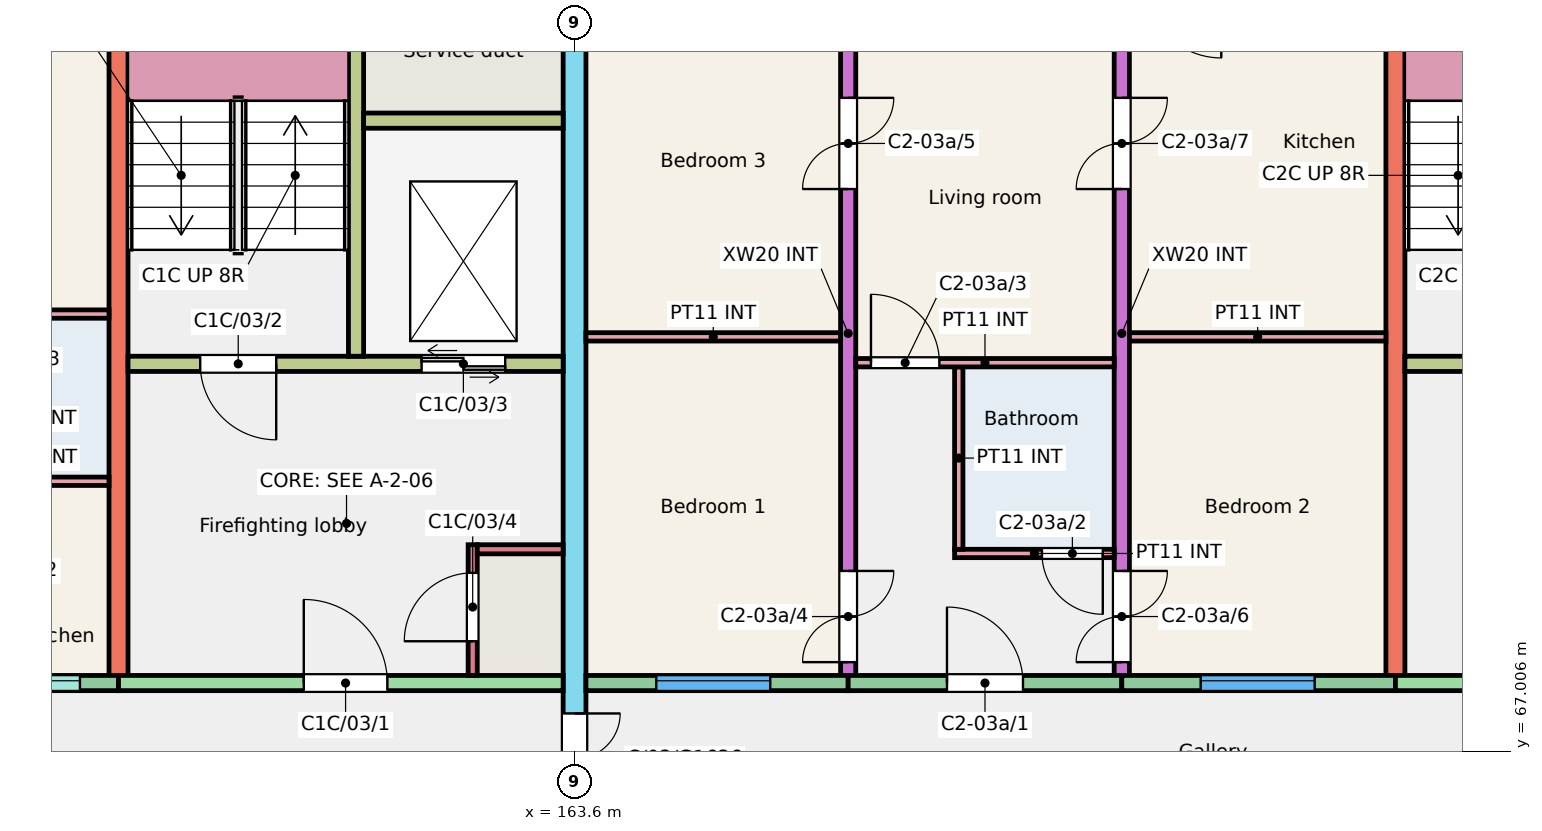
"""IFC4 building model, lengths in metres.
Left out: names, types, materials, properties, quantities, classifications, styles, units other than length and angle.
Written with IfcOpenShell. Run it as: python <this file> out.ifc"""

import sys

from ifc_helpers import new_model, si_unit, direction, frame, frame_2d, origin, place, context, subcontext, project, spatial, rectangle, extrude, element, fill, save


model = new_model("IFC4")
c1 = context("Model", 3, precision=1e-05, world=origin(), true_north=direction((0.0, 1.0)))
c2 = subcontext(c1, "Body", "Model", "MODEL_VIEW")
j1 = project(units=[si_unit("LENGTHUNIT", "METRE"), si_unit("PLANEANGLEUNIT", "RADIAN")], contexts=[c1])
p1 = place(None, origin())
s1 = spatial("IfcSite", under=j1, at=p1, CompositionType="ELEMENT")
p2 = place(p1, origin())
s2 = spatial("IfcBuilding", under=s1, at=p2, CompositionType="ELEMENT")
p3 = place(p2, frame((0.0, 0.0, 9.0)))
s3 = spatial("IfcBuildingStorey", under=s2, at=p3, CompositionType="ELEMENT", Elevation=9.0)
p4 = place(p3, frame((157.6, 68.0, 0.0), z_axis=(0.0, 0.0, 1.0), x_axis=(0.0, 1.0, 0.0)))
e1 = element("IfcWall", 1, at=p4, inside=s3, PredefinedType="SHEAR", context=c2, shape_type="SweptSolid", body=[
    extrude(rectangle(XDim=9.0, YDim=0.25, at=frame_2d((4.5, 0.0))), origin(), (0.0, 0.0, 1.0), 3.0),
])
p5 = place(p3, frame((163.6, 66.0, 0.0), z_axis=(0.0, 0.0, 1.0), x_axis=(0.0, 1.0, 0.0)))
e2 = element("IfcWall", 2, at=p5, inside=s3, PredefinedType="SHEAR", context=c2, shape_type="SweptSolid", body=[
    extrude(rectangle(XDim=11.0, YDim=0.3, at=frame_2d((5.5, 0.0))), origin(), (0.0, 0.0, 1.0), 3.0),
])
p6 = place(p5, frame((0.3, 0.0, 0.0)))
e3 = element("IfcOpeningElement", 3, at=p6, cuts=e2, PredefinedType="OPENING", context=c2, shape_type="SweptSolid", body=[
    extrude(rectangle(XDim=1.2, YDim=2.1, at=frame_2d((0.6, 1.05))), frame((0.0, 0.16, 0.0), z_axis=(0.0, -1.0, 0.0), x_axis=(1.0, 0.0, 0.0)), (0.0, 0.0, 1.0), 0.32),
])
p7 = place(p3, frame((167.2, 68.0, 0.0), z_axis=(0.0, 0.0, 1.0), x_axis=(0.0, 1.0, 0.0)))
e4 = element("IfcWall", 4, at=p7, inside=s3, PredefinedType="SHEAR", context=c2, shape_type="SweptSolid", body=[
    extrude(rectangle(XDim=9.0, YDim=0.2, at=frame_2d((4.5, 0.0))), origin(), (0.0, 0.0, 1.0), 3.0),
])
p8 = place(p7, frame((0.175, 0.0, 0.0)))
e5 = element("IfcOpeningElement", 5, at=p8, cuts=e4, PredefinedType="OPENING", context=c2, shape_type="SweptSolid", body=[
    extrude(rectangle(XDim=1.2, YDim=2.1, at=frame_2d((0.6, 1.05))), frame((0.0, 0.11, 0.0), z_axis=(0.0, -1.0, 0.0), x_axis=(1.0, 0.0, 0.0)), (0.0, 0.0, 1.0), 0.22),
])
p9 = place(p7, frame((6.4, 0.0, 0.0)))
e6 = element("IfcOpeningElement", 6, at=p9, cuts=e4, PredefinedType="OPENING", context=c2, shape_type="SweptSolid", body=[
    extrude(rectangle(XDim=1.2, YDim=2.1, at=frame_2d((0.6, 1.05))), frame((0.0, 0.11, 0.0), z_axis=(0.0, -1.0, 0.0), x_axis=(1.0, 0.0, 0.0)), (0.0, 0.0, 1.0), 0.22),
])
p10 = place(p3, frame((170.8, 68.0, 0.0), z_axis=(0.0, 0.0, 1.0), x_axis=(0.0, 1.0, 0.0)))
e7 = element("IfcWall", 7, at=p10, inside=s3, PredefinedType="SHEAR", context=c2, shape_type="SweptSolid", body=[
    extrude(rectangle(XDim=9.0, YDim=0.2, at=frame_2d((4.5, 0.0))), origin(), (0.0, 0.0, 1.0), 3.0),
])
p11 = place(p10, frame((0.175, 0.0, 0.0)))
e8 = element("IfcOpeningElement", 8, at=p11, cuts=e7, PredefinedType="OPENING", context=c2, shape_type="SweptSolid", body=[
    extrude(rectangle(XDim=1.2, YDim=2.1, at=frame_2d((0.6, 1.05))), frame((0.0, 0.11, 0.0), z_axis=(0.0, -1.0, 0.0), x_axis=(1.0, 0.0, 0.0)), (0.0, 0.0, 1.0), 0.22),
])
p12 = place(p10, frame((6.4, 0.0, 0.0)))
e9 = element("IfcOpeningElement", 9, at=p12, cuts=e7, PredefinedType="OPENING", context=c2, shape_type="SweptSolid", body=[
    extrude(rectangle(XDim=1.2, YDim=2.1, at=frame_2d((0.6, 1.05))), frame((0.0, 0.11, 0.0), z_axis=(0.0, -1.0, 0.0), x_axis=(1.0, 0.0, 0.0)), (0.0, 0.0, 1.0), 0.22),
])
p13 = place(p3, frame((174.4, 68.0, 0.0), z_axis=(0.0, 0.0, 1.0), x_axis=(0.0, 1.0, 0.0)))
e10 = element("IfcWall", 10, at=p13, inside=s3, PredefinedType="SHEAR", context=c2, shape_type="SweptSolid", body=[
    extrude(rectangle(XDim=9.0, YDim=0.25, at=frame_2d((4.5, 0.0))), origin(), (0.0, 0.0, 1.0), 3.0),
])
p14 = place(p3, frame((154.0, 67.9, 0.0), z_axis=(0.0, 0.0, 1.0), x_axis=(1.0, 0.0, 0.0)))
e11 = element("IfcWall", 11, at=p14, inside=s3, PredefinedType="SOLIDWALL", context=c2, shape_type="SweptSolid", body=[
    extrude(rectangle(XDim=3.6, YDim=0.2, at=frame_2d((1.8, 0.0))), origin(), (0.0, 0.0, 1.0), 3.0),
])
p15 = place(p14, frame((1.893, 0.0, 1.1)))
e12 = element("IfcOpeningElement", 12, at=p15, cuts=e11, PredefinedType="OPENING", context=c2, shape_type="SweptSolid", body=[
    extrude(rectangle(XDim=1.2, YDim=1.3, at=frame_2d((0.6, 0.65))), frame((0.0, 0.11, 0.0), z_axis=(0.0, -1.0, 0.0), x_axis=(1.0, 0.0, 0.0)), (0.0, 0.0, 1.0), 0.22),
])
p16 = place(p14, frame((0.25, 0.0, 0.0)))
e13 = element("IfcOpeningElement", 13, at=p16, cuts=e11, PredefinedType="OPENING", context=c2, shape_type="SweptSolid", body=[
    extrude(rectangle(XDim=1.0, YDim=2.1, at=frame_2d((0.5, 1.05))), frame((0.0, 0.11, 0.0), z_axis=(0.0, -1.0, 0.0), x_axis=(1.0, 0.0, 0.0)), (0.0, 0.0, 1.0), 0.22),
])
p17 = place(p3, frame((157.6, 67.9, 0.0), z_axis=(0.0, 0.0, 1.0), x_axis=(1.0, 0.0, 0.0)))
e14 = element("IfcWall", 14, at=p17, inside=s3, PredefinedType="SHEAR", context=c2, shape_type="SweptSolid", body=[
    extrude(rectangle(XDim=5.85, YDim=0.2, at=frame_2d((2.925, 0.0))), origin(), (0.0, 0.0, 1.0), 3.0),
])
p18 = place(p17, frame((2.438, 0.0, 0.0)))
e15 = element("IfcOpeningElement", 15, at=p18, cuts=e14, PredefinedType="OPENING", context=c2, shape_type="SweptSolid", body=[
    extrude(rectangle(XDim=1.1, YDim=2.1, at=frame_2d((0.55, 1.05))), frame((0.0, 0.11, 0.0), z_axis=(0.0, -1.0, 0.0), x_axis=(1.0, 0.0, 0.0)), (0.0, 0.0, 1.0), 0.22),
])
p19 = place(p3, frame((157.725, 72.1, 0.0), z_axis=(0.0, 0.0, 1.0), x_axis=(1.0, 0.0, 0.0)))
e16 = element("IfcWall", 16, at=p19, inside=s3, PredefinedType="SHEAR", context=c2, shape_type="SweptSolid", body=[
    extrude(rectangle(XDim=5.725, YDim=0.2, at=frame_2d((2.862, 0.0))), origin(), (0.0, 0.0, 1.0), 3.0),
])
p20 = place(p19, frame((0.95, 0.0, 0.0)))
e17 = element("IfcOpeningElement", 17, at=p20, cuts=e16, PredefinedType="OPENING", context=c2, shape_type="SweptSolid", body=[
    extrude(rectangle(XDim=1.0, YDim=2.1, at=frame_2d((0.5, 1.05))), frame((0.0, 0.11, 0.0), z_axis=(0.0, -1.0, 0.0), x_axis=(1.0, 0.0, 0.0)), (0.0, 0.0, 1.0), 0.22),
])
p21 = place(p19, frame((3.863, 0.0, 0.0)))
e18 = element("IfcOpeningElement", 18, at=p21, cuts=e16, PredefinedType="OPENING", context=c2, shape_type="SweptSolid", body=[
    extrude(rectangle(XDim=1.1, YDim=2.1, at=frame_2d((0.55, 1.05))), frame((0.0, 0.11, 0.0), z_axis=(0.0, -1.0, 0.0), x_axis=(1.0, 0.0, 0.0)), (0.0, 0.0, 1.0), 0.22),
])
p22 = place(p3, frame((160.725, 72.2, 0.0), z_axis=(0.0, 0.0, 1.0), x_axis=(0.0, 1.0, 0.0)))
e19 = element("IfcWall", 19, at=p22, inside=s3, PredefinedType="SHEAR", context=c2, shape_type="SweptSolid", body=[
    extrude(rectangle(XDim=4.8, YDim=0.2, at=frame_2d((2.4, 0.0))), origin(), (0.0, 0.0, 1.0), 3.0),
])
p23 = place(p3, frame((160.825, 75.3, 0.0), z_axis=(0.0, 0.0, 1.0), x_axis=(1.0, 0.0, 0.0)))
e20 = element("IfcWall", 20, at=p23, inside=s3, PredefinedType="SHEAR", context=c2, shape_type="SweptSolid", body=[
    extrude(rectangle(XDim=2.625, YDim=0.2, at=frame_2d((1.312, 0.0))), origin(), (0.0, 0.0, 1.0), 3.0),
])
p24 = place(p3, frame((162.26, 68.0, 0.0), z_axis=(0.0, 0.0, 1.0), x_axis=(0.0, 1.0, 0.0)))
e21 = element("IfcWall", 21, at=p24, inside=s3, PredefinedType="SHEAR", context=c2, shape_type="SweptSolid", body=[
    extrude(rectangle(XDim=1.72, YDim=0.12, at=frame_2d((0.86, 0.0))), origin(), (0.0, 0.0, 1.0), 3.0),
])
p25 = place(p24, frame((0.45, 0.0, 0.0)))
e22 = element("IfcOpeningElement", 22, at=p25, cuts=e21, PredefinedType="OPENING", context=c2, shape_type="SweptSolid", body=[
    extrude(rectangle(XDim=0.9, YDim=2.1, at=frame_2d((0.45, 1.05))), frame((0.0, 0.07, 0.0), z_axis=(0.0, -1.0, 0.0), x_axis=(1.0, 0.0, 0.0)), (0.0, 0.0, 1.0), 0.14),
])
p26 = place(p3, frame((162.32, 69.66, 0.0), z_axis=(0.0, 0.0, 1.0), x_axis=(1.0, 0.0, 0.0)))
e23 = element("IfcWall", 23, at=p26, inside=s3, PredefinedType="SHEAR", context=c2, shape_type="SweptSolid", body=[
    extrude(rectangle(XDim=1.13, YDim=0.12, at=frame_2d((0.565, 0.0))), origin(), (0.0, 0.0, 1.0), 3.0),
])
p27 = place(p3, frame((163.75, 67.9, 0.0), z_axis=(0.0, 0.0, 1.0), x_axis=(1.0, 0.0, 0.0)))
e24 = element("IfcWall", 24, at=p27, inside=s3, PredefinedType="SOLIDWALL", context=c2, shape_type="SweptSolid", body=[
    extrude(rectangle(XDim=3.45, YDim=0.2, at=frame_2d((1.725, 0.0))), origin(), (0.0, 0.0, 1.0), 3.0),
])
p28 = place(p27, frame((0.925, 0.0, 0.9)))
e25 = element("IfcOpeningElement", 25, at=p28, cuts=e24, PredefinedType="OPENING", context=c2, shape_type="SweptSolid", body=[
    extrude(rectangle(XDim=1.5, YDim=1.5, at=frame_2d((0.75, 0.75))), frame((0.0, 0.11, 0.0), z_axis=(0.0, -1.0, 0.0), x_axis=(1.0, 0.0, 0.0)), (0.0, 0.0, 1.0), 0.22),
])
p29 = place(p3, frame((167.2, 67.9, 0.0), z_axis=(0.0, 0.0, 1.0), x_axis=(1.0, 0.0, 0.0)))
e26 = element("IfcWall", 26, at=p29, inside=s3, PredefinedType="SOLIDWALL", context=c2, shape_type="SweptSolid", body=[
    extrude(rectangle(XDim=3.6, YDim=0.2, at=frame_2d((1.8, 0.0))), origin(), (0.0, 0.0, 1.0), 3.0),
])
p30 = place(p29, frame((1.3, 0.0, 0.0)))
e27 = element("IfcOpeningElement", 27, at=p30, cuts=e26, PredefinedType="OPENING", context=c2, shape_type="SweptSolid", body=[
    extrude(rectangle(XDim=1.0, YDim=2.1, at=frame_2d((0.5, 1.05))), frame((0.0, 0.11, 0.0), z_axis=(0.0, -1.0, 0.0), x_axis=(1.0, 0.0, 0.0)), (0.0, 0.0, 1.0), 0.22),
])
p31 = place(p3, frame((170.8, 67.9, 0.0), z_axis=(0.0, 0.0, 1.0), x_axis=(1.0, 0.0, 0.0)))
e28 = element("IfcWall", 28, at=p31, inside=s3, PredefinedType="SOLIDWALL", context=c2, shape_type="SweptSolid", body=[
    extrude(rectangle(XDim=3.6, YDim=0.2, at=frame_2d((1.8, 0.0))), origin(), (0.0, 0.0, 1.0), 3.0),
])
p32 = place(p31, frame((1.038, 0.0, 0.9)))
e29 = element("IfcOpeningElement", 29, at=p32, cuts=e28, PredefinedType="OPENING", context=c2, shape_type="SweptSolid", body=[
    extrude(rectangle(XDim=1.5, YDim=1.5, at=frame_2d((0.75, 0.75))), frame((0.0, 0.11, 0.0), z_axis=(0.0, -1.0, 0.0), x_axis=(1.0, 0.0, 0.0)), (0.0, 0.0, 1.0), 0.22),
])
p33 = place(p3, frame((174.4, 67.9, 0.0), z_axis=(0.0, 0.0, 1.0), x_axis=(1.0, 0.0, 0.0)))
e30 = element("IfcWall", 30, at=p33, inside=s3, PredefinedType="SHEAR", context=c2, shape_type="SweptSolid", body=[
    extrude(rectangle(XDim=5.85, YDim=0.2, at=frame_2d((2.925, 0.0))), origin(), (0.0, 0.0, 1.0), 3.0),
])
p34 = place(p33, frame((2.438, 0.0, 0.0)))
e31 = element("IfcOpeningElement", 31, at=p34, cuts=e30, PredefinedType="OPENING", context=c2, shape_type="SweptSolid", body=[
    extrude(rectangle(XDim=1.1, YDim=2.1, at=frame_2d((0.55, 1.05))), frame((0.0, 0.11, 0.0), z_axis=(0.0, -1.0, 0.0), x_axis=(1.0, 0.0, 0.0)), (0.0, 0.0, 1.0), 0.22),
])
p35 = place(p3, frame((174.525, 72.1, 0.0), z_axis=(0.0, 0.0, 1.0), x_axis=(1.0, 0.0, 0.0)))
e32 = element("IfcWall", 32, at=p35, inside=s3, PredefinedType="SHEAR", context=c2, shape_type="SweptSolid", body=[
    extrude(rectangle(XDim=5.725, YDim=0.2, at=frame_2d((2.863, 0.0))), origin(), (0.0, 0.0, 1.0), 3.0),
])
p36 = place(p35, frame((0.95, 0.0, 0.0)))
e33 = element("IfcOpeningElement", 33, at=p36, cuts=e32, PredefinedType="OPENING", context=c2, shape_type="SweptSolid", body=[
    extrude(rectangle(XDim=1.0, YDim=2.1, at=frame_2d((0.5, 1.05))), frame((0.0, 0.11, 0.0), z_axis=(0.0, -1.0, 0.0), x_axis=(1.0, 0.0, 0.0)), (0.0, 0.0, 1.0), 0.22),
])
p37 = place(p35, frame((3.863, 0.0, 0.0)))
e34 = element("IfcOpeningElement", 34, at=p37, cuts=e32, PredefinedType="OPENING", context=c2, shape_type="SweptSolid", body=[
    extrude(rectangle(XDim=1.1, YDim=2.1, at=frame_2d((0.55, 1.05))), frame((0.0, 0.11, 0.0), z_axis=(0.0, -1.0, 0.0), x_axis=(1.0, 0.0, 0.0)), (0.0, 0.0, 1.0), 0.22),
])
p38 = place(p3, frame((155.51, 70.555, 0.0), z_axis=(0.0, 0.0, 1.0), x_axis=(1.0, 0.0, 0.0)))
e35 = element("IfcWall", 35, at=p38, inside=s3, PredefinedType="PARTITIONING", context=c2, shape_type="SweptSolid", body=[
    extrude(rectangle(XDim=1.965, YDim=0.11, at=frame_2d((0.982, 0.0))), origin(), (0.0, 0.0, 1.0), 2.8),
])
p39 = place(p3, frame((154.1, 72.755, 0.0), z_axis=(0.0, 0.0, 1.0), x_axis=(1.0, 0.0, 0.0)))
e36 = element("IfcWall", 36, at=p39, inside=s3, PredefinedType="PARTITIONING", context=c2, shape_type="SweptSolid", body=[
    extrude(rectangle(XDim=3.375, YDim=0.11, at=frame_2d((1.688, 0.0))), origin(), (0.0, 0.0, 1.0), 2.8),
])
p40 = place(p39, frame((0.2, 0.0, 0.0)))
e37 = element("IfcOpeningElement", 37, at=p40, cuts=e36, PredefinedType="OPENING", context=c2, shape_type="SweptSolid", body=[
    extrude(rectangle(XDim=0.9, YDim=2.1, at=frame_2d((0.45, 1.05))), frame((0.0, 0.065, 0.0), z_axis=(0.0, -1.0, 0.0), x_axis=(1.0, 0.0, 0.0)), (0.0, 0.0, 1.0), 0.13),
])
p41 = place(p3, frame((168.6, 69.605, 0.0), z_axis=(0.0, 0.0, 1.0), x_axis=(1.0, 0.0, 0.0)))
e38 = element("IfcWall", 38, at=p41, inside=s3, PredefinedType="PARTITIONING", context=c2, shape_type="SweptSolid", body=[
    extrude(rectangle(XDim=2.1, YDim=0.11, at=frame_2d((1.05, 0.0))), origin(), (0.0, 0.0, 1.0), 2.8),
])
p42 = place(p41, frame((1.15, 0.0, 0.0)))
e39 = element("IfcOpeningElement", 39, at=p42, cuts=e38, PredefinedType="OPENING", context=c2, shape_type="SweptSolid", body=[
    extrude(rectangle(XDim=0.8, YDim=2.1, at=frame_2d((0.4, 1.05))), frame((0.0, 0.065, 0.0), z_axis=(0.0, -1.0, 0.0), x_axis=(1.0, 0.0, 0.0)), (0.0, 0.0, 1.0), 0.13),
])
p43 = place(p3, frame((168.655, 69.66, 0.0), z_axis=(0.0, 0.0, 1.0), x_axis=(0.0, 1.0, 0.0)))
e40 = element("IfcWall", 40, at=p43, inside=s3, PredefinedType="PARTITIONING", context=c2, shape_type="SweptSolid", body=[
    extrude(rectangle(XDim=2.4, YDim=0.11, at=frame_2d((1.2, 0.0))), origin(), (0.0, 0.0, 1.0), 2.8),
])
p44 = place(p3, frame((167.3, 72.115, 0.0), z_axis=(0.0, 0.0, 1.0), x_axis=(1.0, 0.0, 0.0)))
e41 = element("IfcWall", 41, at=p44, inside=s3, PredefinedType="PARTITIONING", context=c2, shape_type="SweptSolid", body=[
    extrude(rectangle(XDim=3.4, YDim=0.11, at=frame_2d((1.7, 0.0))), origin(), (0.0, 0.0, 1.0), 2.8),
])
p45 = place(p44, frame((0.2, 0.0, 0.0)))
e42 = element("IfcOpeningElement", 42, at=p45, cuts=e41, PredefinedType="OPENING", context=c2, shape_type="SweptSolid", body=[
    extrude(rectangle(XDim=0.9, YDim=2.1, at=frame_2d((0.45, 1.05))), frame((0.0, 0.065, 0.0), z_axis=(0.0, -1.0, 0.0), x_axis=(1.0, 0.0, 0.0)), (0.0, 0.0, 1.0), 0.13),
])
p46 = place(p3, frame((163.75, 72.455, 0.0), z_axis=(0.0, 0.0, 1.0), x_axis=(1.0, 0.0, 0.0)))
e43 = element("IfcWall", 43, at=p46, inside=s3, PredefinedType="PARTITIONING", context=c2, shape_type="SweptSolid", body=[
    extrude(rectangle(XDim=3.35, YDim=0.11, at=frame_2d((1.675, 0.0))), origin(), (0.0, 0.0, 1.0), 2.8),
])
p47 = place(p3, frame((170.9, 72.455, 0.0), z_axis=(0.0, 0.0, 1.0), x_axis=(1.0, 0.0, 0.0)))
e44 = element("IfcWall", 44, at=p47, inside=s3, PredefinedType="PARTITIONING", context=c2, shape_type="SweptSolid", body=[
    extrude(rectangle(XDim=3.375, YDim=0.11, at=frame_2d((1.688, 0.0))), origin(), (0.0, 0.0, 1.0), 2.8),
])
p48 = place(p15, origin())
e45 = element("IfcWindow", 45, at=p48, inside=s3, PartitioningType="SINGLE_PANEL", PredefinedType="WINDOW", context=c2, shape_type="SweptSolid", body=[
    extrude(rectangle(XDim=1.2, YDim=1.3, at=frame_2d((0.6, 0.65))), frame((0.0, 0.06, 0.0), z_axis=(0.0, -1.0, 0.0), x_axis=(1.0, 0.0, 0.0)), (0.0, 0.0, 1.0), 0.06),
])
fill(e12, e45)
p49 = place(p28, origin())
e46 = element("IfcWindow", 46, at=p49, inside=s3, PartitioningType="SINGLE_PANEL", PredefinedType="WINDOW", context=c2, shape_type="SweptSolid", body=[
    extrude(rectangle(XDim=1.5, YDim=1.5, at=frame_2d((0.75, 0.75))), frame((0.0, 0.06, 0.0), z_axis=(0.0, -1.0, 0.0), x_axis=(1.0, 0.0, 0.0)), (0.0, 0.0, 1.0), 0.06),
])
fill(e25, e46)
p50 = place(p32, origin())
e47 = element("IfcWindow", 47, at=p50, inside=s3, PartitioningType="SINGLE_PANEL", PredefinedType="WINDOW", context=c2, shape_type="SweptSolid", body=[
    extrude(rectangle(XDim=1.5, YDim=1.5, at=frame_2d((0.75, 0.75))), frame((0.0, 0.06, 0.0), z_axis=(0.0, -1.0, 0.0), x_axis=(1.0, 0.0, 0.0)), (0.0, 0.0, 1.0), 0.06),
])
fill(e29, e47)
p51 = place(p30, origin())
e48 = element("IfcDoor", 48, at=p51, inside=s3, OperationType="SINGLE_SWING_LEFT", PredefinedType="DOOR", context=c2, shape_type="SweptSolid", body=[
    extrude(rectangle(XDim=1.0, YDim=2.1, at=frame_2d((0.5, 1.05))), frame((0.0, 0.025, 0.0), z_axis=(0.0, -1.0, 0.0), x_axis=(1.0, 0.0, 0.0)), (0.0, 0.0, 1.0), 0.05),
])
fill(e27, e48)
p52 = place(p42, origin())
e49 = element("IfcDoor", 49, at=p52, inside=s3, OperationType="SINGLE_SWING_RIGHT", PredefinedType="DOOR", context=c2, shape_type="SweptSolid", body=[
    extrude(rectangle(XDim=0.8, YDim=2.1, at=frame_2d((0.4, 1.05))), frame((0.0, 0.025, 0.0), z_axis=(0.0, -1.0, 0.0), x_axis=(1.0, 0.0, 0.0)), (0.0, 0.0, 1.0), 0.05),
])
fill(e39, e49)
p53 = place(p45, origin())
e50 = element("IfcDoor", 50, at=p53, inside=s3, OperationType="SINGLE_SWING_LEFT", PredefinedType="DOOR", context=c2, shape_type="SweptSolid", body=[
    extrude(rectangle(XDim=0.9, YDim=2.1, at=frame_2d((0.45, 1.05))), frame((0.0, 0.025, 0.0), z_axis=(0.0, -1.0, 0.0), x_axis=(1.0, 0.0, 0.0)), (0.0, 0.0, 1.0), 0.05),
])
fill(e42, e50)
p54 = place(p8, origin())
e51 = element("IfcDoor", 51, at=p54, inside=s3, OperationType="DOUBLE_DOOR_SINGLE_SWING", PredefinedType="DOOR", context=c2, shape_type="SweptSolid", body=[
    extrude(rectangle(XDim=1.2, YDim=2.1, at=frame_2d((0.6, 1.05))), frame((0.0, 0.025, 0.0), z_axis=(0.0, -1.0, 0.0), x_axis=(1.0, 0.0, 0.0)), (0.0, 0.0, 1.0), 0.05),
])
fill(e5, e51)
p55 = place(p9, origin())
e52 = element("IfcDoor", 52, at=p55, inside=s3, OperationType="DOUBLE_DOOR_SINGLE_SWING", PredefinedType="DOOR", context=c2, shape_type="SweptSolid", body=[
    extrude(rectangle(XDim=1.2, YDim=2.1, at=frame_2d((0.6, 1.05))), frame((0.0, 0.025, 0.0), z_axis=(0.0, -1.0, 0.0), x_axis=(1.0, 0.0, 0.0)), (0.0, 0.0, 1.0), 0.05),
])
fill(e6, e52)
p56 = place(p11, origin())
e53 = element("IfcDoor", 53, at=p56, inside=s3, OperationType="DOUBLE_DOOR_SINGLE_SWING", PredefinedType="DOOR", context=c2, shape_type="SweptSolid", body=[
    extrude(rectangle(XDim=1.2, YDim=2.1, at=frame_2d((0.6, 1.05))), frame((0.0, 0.025, 0.0), z_axis=(0.0, -1.0, 0.0), x_axis=(1.0, 0.0, 0.0)), (0.0, 0.0, 1.0), 0.05),
])
fill(e8, e53)
p57 = place(p12, origin())
e54 = element("IfcDoor", 54, at=p57, inside=s3, OperationType="DOUBLE_DOOR_SINGLE_SWING", PredefinedType="DOOR", context=c2, shape_type="SweptSolid", body=[
    extrude(rectangle(XDim=1.2, YDim=2.1, at=frame_2d((0.6, 1.05))), frame((0.0, 0.025, 0.0), z_axis=(0.0, -1.0, 0.0), x_axis=(1.0, 0.0, 0.0)), (0.0, 0.0, 1.0), 0.05),
])
fill(e9, e54)
p58 = place(p18, origin())
e55 = element("IfcDoor", 55, at=p58, inside=s3, OperationType="SINGLE_SWING_LEFT", PredefinedType="DOOR", context=c2, shape_type="SweptSolid", body=[
    extrude(rectangle(XDim=1.1, YDim=2.1, at=frame_2d((0.55, 1.05))), frame((0.0, 0.025, 0.0), z_axis=(0.0, -1.0, 0.0), x_axis=(1.0, 0.0, 0.0)), (0.0, 0.0, 1.0), 0.05),
])
fill(e15, e55)
p59 = place(p20, origin())
e56 = element("IfcDoor", 56, at=p59, inside=s3, OperationType="SINGLE_SWING_RIGHT", PredefinedType="DOOR", context=c2, shape_type="SweptSolid", body=[
    extrude(rectangle(XDim=1.0, YDim=2.1, at=frame_2d((0.5, 1.05))), frame((0.0, 0.025, 0.0), z_axis=(0.0, -1.0, 0.0), x_axis=(1.0, 0.0, 0.0)), (0.0, 0.0, 1.0), 0.05),
])
fill(e17, e56)
p60 = place(p21, origin())
e57 = element("IfcDoor", 57, at=p60, inside=s3, OperationType="DOUBLE_DOOR_SLIDING", PredefinedType="DOOR", context=c2, shape_type="SweptSolid", body=[
    extrude(rectangle(XDim=1.1, YDim=2.1, at=frame_2d((0.55, 1.05))), frame((0.0, 0.025, 0.0), z_axis=(0.0, -1.0, 0.0), x_axis=(1.0, 0.0, 0.0)), (0.0, 0.0, 1.0), 0.05),
])
fill(e18, e57)
p61 = place(p25, origin())
e58 = element("IfcDoor", 58, at=p61, inside=s3, OperationType="SINGLE_SWING_LEFT", PredefinedType="DOOR", context=c2, shape_type="SweptSolid", body=[
    extrude(rectangle(XDim=0.9, YDim=2.1, at=frame_2d((0.45, 1.05))), frame((0.0, 0.025, 0.0), z_axis=(0.0, -1.0, 0.0), x_axis=(1.0, 0.0, 0.0)), (0.0, 0.0, 1.0), 0.05),
])
fill(e22, e58)
p62 = place(p6, origin())
e59 = element("IfcDoor", 59, at=p62, inside=s3, OperationType="DOUBLE_DOOR_SINGLE_SWING", PredefinedType="DOOR", context=c2, shape_type="SweptSolid", body=[
    extrude(rectangle(XDim=1.2, YDim=2.1, at=frame_2d((0.6, 1.05))), frame((0.0, 0.025, 0.0), z_axis=(0.0, -1.0, 0.0), x_axis=(1.0, 0.0, 0.0)), (0.0, 0.0, 1.0), 0.05),
])
fill(e3, e59)
save(model, sys.argv[1])
